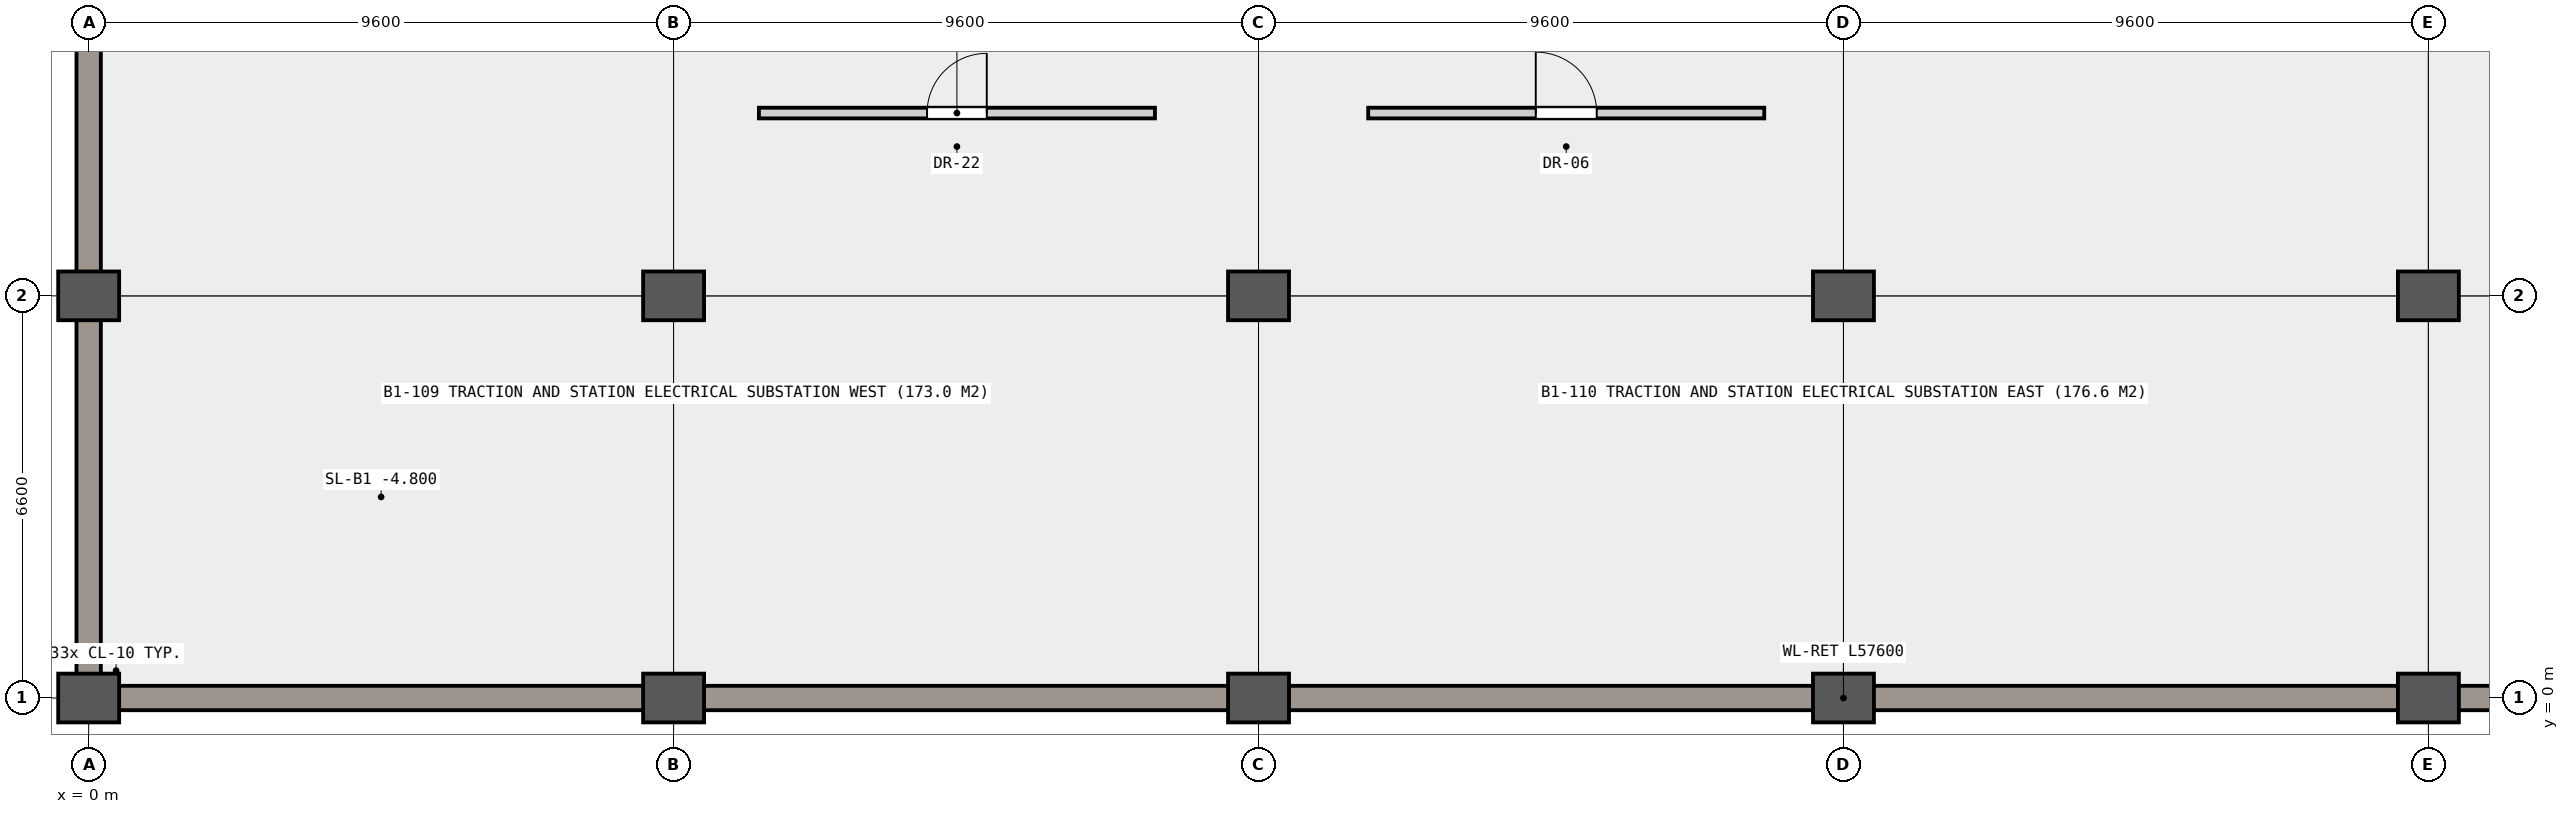
"""IFC4 building model, lengths in metres.
Left out: names, types, materials, properties, quantities, classifications, styles, units other than length and angle.
Written with IfcOpenShell. Run it as: python <this file> out.ifc"""

import sys

from ifc_helpers import new_model, si_unit, direction, frame, frame_2d, origin, origin_2d, place, context, subcontext, project, spatial, rectangle, extrude, element, fill, save


model = new_model("IFC4")
c1 = context("Model", 3, precision=1e-05, world=origin(), true_north=direction((0.0, 1.0)))
c2 = subcontext(c1, "Body", "Model", "MODEL_VIEW")
j1 = project(units=[si_unit("LENGTHUNIT", "METRE"), si_unit("PLANEANGLEUNIT", "RADIAN")], contexts=[c1])
p1 = place(None, origin())
s1 = spatial("IfcSite", under=j1, at=p1, CompositionType="ELEMENT")
p2 = place(p1, origin())
s2 = spatial("IfcBuilding", under=s1, at=p2, CompositionType="ELEMENT")
p3 = place(p2, frame((0.0, 0.0, -4.8)))
s3 = spatial("IfcBuildingStorey", under=s2, at=p3, CompositionType="ELEMENT", Elevation=-4.8)
for number, where, z_axis, x_axis in (
    (1, (0.0, 0.0, 0.0), (0.0, 0.0, 1.0), (1.0, 0.0, 0.0)),
    (2, (0.0, 6.6, 0.0), (0.0, 0.0, 1.0), (1.0, 0.0, 0.0)),
    (3, (9.6, 0.0, 0.0), (0.0, 0.0, 1.0), (1.0, 0.0, 0.0)),
    (4, (9.6, 6.6, 0.0), (0.0, 0.0, 1.0), (1.0, 0.0, 0.0)),
    (5, (19.2, 0.0, 0.0), (0.0, 0.0, 1.0), (1.0, 0.0, 0.0)),
    (6, (19.2, 6.6, 0.0), (0.0, 0.0, 1.0), (1.0, 0.0, 0.0)),
    (7, (28.8, 0.0, 0.0), (0.0, 0.0, 1.0), (1.0, 0.0, 0.0)),
    (8, (28.8, 6.6, 0.0), (0.0, 0.0, 1.0), (1.0, 0.0, 0.0)),
    (9, (38.4, 0.0, 0.0), (0.0, 0.0, 1.0), (1.0, 0.0, 0.0)),
    (10, (38.4, 6.6, 0.0), (0.0, 0.0, 1.0), (1.0, 0.0, 0.0)),
):
    element("IfcColumn", number, at=place(p3, frame(where, z_axis=z_axis, x_axis=x_axis)), inside=s3, PredefinedType="COLUMN", context=c2, shape_type="SweptSolid", body=[
        extrude(rectangle(XDim=1.0, YDim=0.8, at=origin_2d()), origin(), (0.0, 0.0, 1.0), 4.8),
    ])
p4 = place(p3, frame((0.0, 0.0, 0.0), z_axis=(0.0, 0.0, 1.0), x_axis=(0.0, 1.0, 0.0)))
e11 = element("IfcWall", 11, at=p4, inside=s3, PredefinedType="USERDEFINED", context=c2, shape_type="SweptSolid", body=[
    extrude(rectangle(XDim=67.2, YDim=0.4, at=frame_2d((33.6, 0.0))), origin(), (0.0, 0.0, 1.0), 3.88),
])
p5 = place(p3, frame((57.6, 0.0, 0.0), z_axis=(0.0, 0.0, 1.0), x_axis=(-1.0, 0.0, 0.0)))
e12 = element("IfcWall", 12, at=p5, inside=s3, PredefinedType="USERDEFINED", context=c2, shape_type="SweptSolid", body=[
    extrude(rectangle(XDim=57.6, YDim=0.4, at=frame_2d((28.8, 0.0))), origin(), (0.0, 0.0, 1.0), 3.88),
])
p6 = place(p3, frame((11.0, 9.6, 0.0), z_axis=(0.0, 0.0, 1.0), x_axis=(1.0, 0.0, 0.0)))
e13 = element("IfcWall", 13, at=p6, inside=s3, PredefinedType="PARTITIONING", context=c2, shape_type="SweptSolid", body=[
    extrude(rectangle(XDim=6.5, YDim=0.175, at=frame_2d((3.25, 0.0))), origin(), (0.0, 0.0, 1.0), 4.48),
])
p7 = place(p6, frame((2.76, 0.0, 0.0)))
e14 = element("IfcOpeningElement", 14, at=p7, cuts=e13, PredefinedType="OPENING", context=c2, shape_type="SweptSolid", body=[
    extrude(rectangle(XDim=0.98, YDim=2.1, at=frame_2d((0.49, 1.05))), frame((0.0, 0.098, 0.0), z_axis=(0.0, -1.0, 0.0), x_axis=(1.0, 0.0, 0.0)), (0.0, 0.0, 1.0), 0.195),
])
p8 = place(p3, frame((21.0, 9.6, 0.0), z_axis=(0.0, 0.0, 1.0), x_axis=(1.0, 0.0, 0.0)))
e15 = element("IfcWall", 15, at=p8, inside=s3, PredefinedType="PARTITIONING", context=c2, shape_type="SweptSolid", body=[
    extrude(rectangle(XDim=6.5, YDim=0.175, at=frame_2d((3.25, 0.0))), origin(), (0.0, 0.0, 1.0), 4.48),
])
p9 = place(p8, frame((2.75, 0.0, 0.0)))
e16 = element("IfcOpeningElement", 16, at=p9, cuts=e15, PredefinedType="OPENING", context=c2, shape_type="SweptSolid", body=[
    extrude(rectangle(XDim=1.0, YDim=2.12, at=frame_2d((0.5, 1.06))), frame((0.0, 0.098, 0.0), z_axis=(0.0, -1.0, 0.0), x_axis=(1.0, 0.0, 0.0)), (0.0, 0.0, 1.0), 0.195),
])
p10 = place(p7, origin())
e17 = element("IfcDoor", 17, at=p10, inside=s3, OperationType="SINGLE_SWING_RIGHT", PredefinedType="DOOR", context=c2, shape_type="SweptSolid", body=[
    extrude(rectangle(XDim=0.98, YDim=2.1, at=frame_2d((0.49, 1.05))), frame((0.0, 0.025, 0.0), z_axis=(0.0, -1.0, 0.0), x_axis=(1.0, 0.0, 0.0)), (0.0, 0.0, 1.0), 0.05),
])
fill(e14, e17)
p11 = place(p9, origin())
e18 = element("IfcDoor", 18, at=p11, inside=s3, OperationType="SINGLE_SWING_LEFT", PredefinedType="DOOR", context=c2, shape_type="SweptSolid", body=[
    extrude(rectangle(XDim=1.0, YDim=2.12, at=frame_2d((0.5, 1.06))), frame((0.0, 0.025, 0.0), z_axis=(0.0, -1.0, 0.0), x_axis=(1.0, 0.0, 0.0)), (0.0, 0.0, 1.0), 0.05),
])
fill(e16, e18)
save(model, sys.argv[1])
